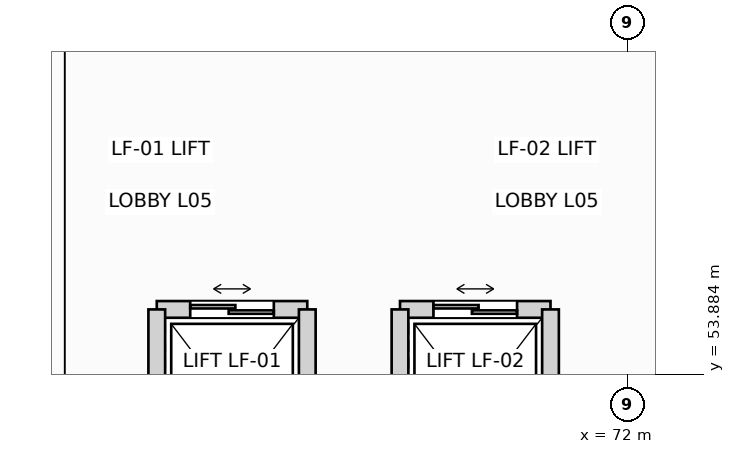
"""IFC4 building model, lengths in metres.
Left out: names, types, materials, properties, quantities, classifications, styles, units other than length and angle.
Written with IfcOpenShell. Run it as: python <this file> out.ifc"""

import sys

from ifc_helpers import new_model, si_unit, direction, frame, frame_2d, origin, place, context, subcontext, project, spatial, rectangle, extrude, element, fill, save


model = new_model("IFC4")
c1 = context("Model", 3, precision=1e-05, world=origin(), true_north=direction((0.0, 1.0)))
c2 = subcontext(c1, "Body", "Model", "MODEL_VIEW")
j1 = project(units=[si_unit("LENGTHUNIT", "METRE"), si_unit("PLANEANGLEUNIT", "RADIAN")], contexts=[c1])
p1 = place(None, origin())
s1 = spatial("IfcSite", under=j1, at=p1, CompositionType="ELEMENT")
p2 = place(p1, origin())
s2 = spatial("IfcBuilding", under=s1, at=p2, CompositionType="ELEMENT")
p3 = place(p2, frame((0.0, 0.0, 26.4)))
s3 = spatial("IfcBuildingStorey", under=s2, at=p3, CompositionType="ELEMENT", Elevation=26.4)
p4 = place(p3, frame((65.81, 54.74, 0.0), z_axis=(0.0, 0.0, 1.0), x_axis=(1.0, 0.0, 0.0)))
e1 = element("IfcWall", 1, at=p4, inside=s3, PredefinedType="PARTITIONING", context=c2, shape_type="SweptSolid", body=[
    extrude(rectangle(XDim=1.98, YDim=0.22, at=frame_2d((0.99, 0.0))), origin(), (0.0, 0.0, 1.0), 3.905),
])
p5 = place(p4, frame((0.44, 0.0, 0.0)))
e2 = element("IfcOpeningElement", 2, at=p5, cuts=e1, PredefinedType="OPENING", context=c2, shape_type="SweptSolid", body=[
    extrude(rectangle(XDim=1.1, YDim=2.18, at=frame_2d((0.55, 1.09))), frame((0.0, 0.12, 0.0), z_axis=(0.0, -1.0, 0.0), x_axis=(1.0, 0.0, 0.0)), (0.0, 0.0, 1.0), 0.24),
])
for number, where, z_axis, x_axis in (
    (3, (65.81, 52.26, 0.0), (0.0, 0.0, 1.0), (0.0, 1.0, 0.0)),
    (4, (67.79, 52.26, 0.0), (0.0, 0.0, 1.0), (0.0, 1.0, 0.0)),
):
    element("IfcWall", number, at=place(p3, frame(where, z_axis=z_axis, x_axis=x_axis)), inside=s3, PredefinedType="PARTITIONING", context=c2, shape_type="SweptSolid", body=[
        extrude(rectangle(XDim=2.48, YDim=0.22, at=frame_2d((1.24, 0.0))), origin(), (0.0, 0.0, 1.0), 3.905),
    ])
p6 = place(p3, frame((69.01, 54.74, 0.0), z_axis=(0.0, 0.0, 1.0), x_axis=(1.0, 0.0, 0.0)))
e5 = element("IfcWall", 5, at=p6, inside=s3, PredefinedType="PARTITIONING", context=c2, shape_type="SweptSolid", body=[
    extrude(rectangle(XDim=1.98, YDim=0.22, at=frame_2d((0.99, 0.0))), origin(), (0.0, 0.0, 1.0), 3.905),
])
p7 = place(p6, frame((0.44, 0.0, 0.0)))
e6 = element("IfcOpeningElement", 6, at=p7, cuts=e5, PredefinedType="OPENING", context=c2, shape_type="SweptSolid", body=[
    extrude(rectangle(XDim=1.1, YDim=2.18, at=frame_2d((0.55, 1.09))), frame((0.0, 0.12, 0.0), z_axis=(0.0, -1.0, 0.0), x_axis=(1.0, 0.0, 0.0)), (0.0, 0.0, 1.0), 0.24),
])
for number, where, z_axis, x_axis in (
    (7, (69.01, 52.26, 0.0), (0.0, 0.0, 1.0), (0.0, 1.0, 0.0)),
    (8, (70.99, 52.26, 0.0), (0.0, 0.0, 1.0), (0.0, 1.0, 0.0)),
):
    element("IfcWall", number, at=place(p3, frame(where, z_axis=z_axis, x_axis=x_axis)), inside=s3, PredefinedType="PARTITIONING", context=c2, shape_type="SweptSolid", body=[
        extrude(rectangle(XDim=2.48, YDim=0.22, at=frame_2d((1.24, 0.0))), origin(), (0.0, 0.0, 1.0), 3.905),
    ])
p8 = place(p5, origin())
e9 = element("IfcDoor", 9, at=p8, inside=s3, OperationType="DOUBLE_DOOR_SLIDING", PredefinedType="DOOR", context=c2, shape_type="SweptSolid", body=[
    extrude(rectangle(XDim=1.1, YDim=2.18, at=frame_2d((0.55, 1.09))), frame((0.0, 0.025, 0.0), z_axis=(0.0, -1.0, 0.0), x_axis=(1.0, 0.0, 0.0)), (0.0, 0.0, 1.0), 0.05),
])
fill(e2, e9)
p9 = place(p7, origin())
e10 = element("IfcDoor", 10, at=p9, inside=s3, OperationType="DOUBLE_DOOR_SLIDING", PredefinedType="DOOR", context=c2, shape_type="SweptSolid", body=[
    extrude(rectangle(XDim=1.1, YDim=2.18, at=frame_2d((0.55, 1.09))), frame((0.0, 0.025, 0.0), z_axis=(0.0, -1.0, 0.0), x_axis=(1.0, 0.0, 0.0)), (0.0, 0.0, 1.0), 0.05),
])
fill(e6, e10)
save(model, sys.argv[1])
